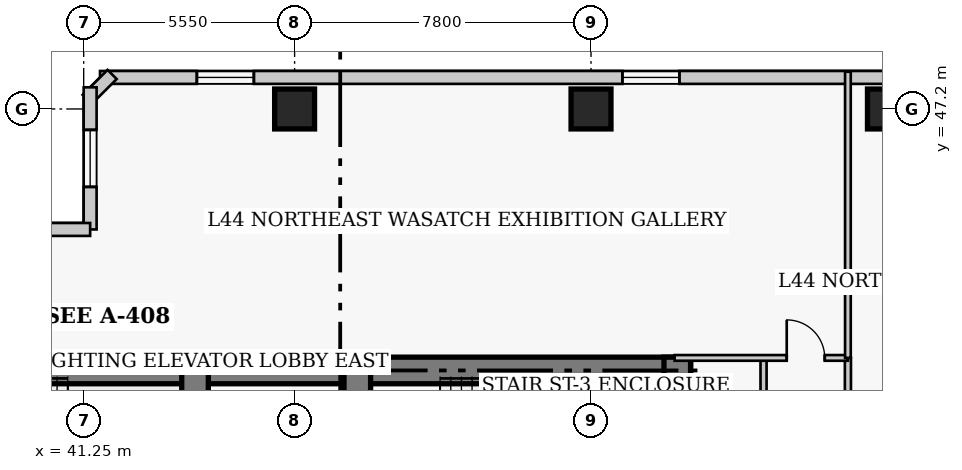
"""IFC4 building model, lengths in metres.
Left out: names, types, materials, properties, quantities, classifications, styles, units other than length and angle.
Written with IfcOpenShell. Run it as: python <this file> out.ifc"""

import sys

from ifc_helpers import new_model, si_unit, direction, frame, frame_2d, origin, origin_2d, place, context, subcontext, project, spatial, rectangle, extrude, element, fill, save


model = new_model("IFC4")
c1 = context("Model", 3, precision=1e-05, world=origin(), true_north=direction((0.0, 1.0)))
c2 = subcontext(c1, "Body", "Model", "MODEL_VIEW")
j1 = project(units=[si_unit("LENGTHUNIT", "METRE"), si_unit("PLANEANGLEUNIT", "RADIAN")], contexts=[c1])
p1 = place(None, origin())
s1 = spatial("IfcSite", under=j1, at=p1, CompositionType="ELEMENT")
p2 = place(p1, origin())
s2 = spatial("IfcBuilding", under=s1, at=p2, CompositionType="ELEMENT")
p3 = place(p2, frame((0.0, 0.0, 176.4)))
s3 = spatial("IfcBuildingStorey", under=s2, at=p3, CompositionType="ELEMENT", Elevation=176.4)
p4 = place(p3, frame((35.85, 40.32, 0.0), z_axis=(0.0, 0.0, 1.0), x_axis=(1.0, 0.0, 0.0)))
e1 = element("IfcWall", 1, at=p4, inside=s3, PredefinedType="SHEAR", context=c2, shape_type="SweptSolid", body=[
    extrude(rectangle(XDim=12.6, YDim=0.7, at=frame_2d((6.3, 0.0))), origin(), (0.0, 0.0, 1.0), 3.8),
])
p5 = place(p3, frame((48.45, 40.32, 0.0), z_axis=(0.0, 0.0, 1.0), x_axis=(1.0, 0.0, 0.0)))
e2 = element("IfcWall", 2, at=p5, inside=s3, PredefinedType="SHEAR", context=c2, shape_type="SweptSolid", body=[
    extrude(rectangle(XDim=8.77, YDim=0.7, at=frame_2d((4.385, 0.0))), origin(), (0.0, 0.0, 1.0), 3.8),
])
p6 = place(p3, frame((56.87, 27.05, 0.0), z_axis=(0.0, 0.0, 1.0), x_axis=(0.0, 1.0, 0.0)))
e3 = element("IfcWall", 3, at=p6, inside=s3, PredefinedType="SHEAR", context=c2, shape_type="SweptSolid", body=[
    extrude(rectangle(XDim=13.62, YDim=0.7, at=frame_2d((6.81, 0.0))), origin(), (0.0, 0.0, 1.0), 3.8),
])
p7 = place(p3, frame((44.18, 36.37, 0.0), z_axis=(0.0, 0.0, 1.0), x_axis=(0.0, 1.0, 0.0)))
e4 = element("IfcWall", 4, at=p7, inside=s3, PredefinedType="SHEAR", context=c2, shape_type="SweptSolid", body=[
    extrude(rectangle(XDim=3.95, YDim=0.7, at=frame_2d((1.975, 0.0))), origin(), (0.0, 0.0, 1.0), 3.8),
])
p8 = place(p3, frame((48.45, 32.4, 0.0), z_axis=(0.0, 0.0, 1.0), x_axis=(0.0, 1.0, 0.0)))
e5 = element("IfcWall", 5, at=p8, inside=s3, PredefinedType="SHEAR", context=c2, shape_type="SweptSolid", body=[
    extrude(rectangle(XDim=7.92, YDim=0.7, at=frame_2d((3.96, 0.0))), origin(), (0.0, 0.0, 1.0), 3.8),
])
p9 = place(p8, frame((5.8, 0.0, 0.0)))
e6 = element("IfcOpeningElement", 6, at=p9, cuts=e5, PredefinedType="OPENING", context=c2, shape_type="SweptSolid", body=[
    extrude(rectangle(XDim=1.1, YDim=2.15, at=frame_2d((0.55, 1.075))), frame((0.0, 0.36, 0.0), z_axis=(0.0, -1.0, 0.0), x_axis=(1.0, 0.0, 0.0)), (0.0, 0.0, 1.0), 0.72),
])
for number, where, z_axis, x_axis in (
    (7, (46.8, 47.2, 0.0), (0.0, 0.0, 1.0), (1.0, 0.0, 0.0)),
    (8, (54.6, 47.2, 0.0), (0.0, 0.0, 1.0), (1.0, 0.0, 0.0)),
    (9, (62.4, 47.2, 0.0), (0.0, 0.0, 1.0), (1.0, 0.0, 0.0)),
):
    element("IfcColumn", number, at=place(p3, frame(where, z_axis=z_axis, x_axis=x_axis)), inside=s3, PredefinedType="COLUMN", context=c2, shape_type="SweptSolid", body=[
        extrude(rectangle(XDim=1.05, YDim=1.05, at=origin_2d()), origin(), (0.0, 0.0, 1.0), 3.8),
    ])
p10 = place(p3, frame((68.37, 48.03, 0.0), z_axis=(0.0, 0.0, 1.0), x_axis=(-1.0, 0.0, 0.0)))
e10 = element("IfcWall", 10, at=p10, inside=s3, PredefinedType="SOLIDWALL", context=c2, shape_type="SweptSolid", body=[
    extrude(rectangle(XDim=26.69, YDim=0.34, at=frame_2d((13.345, 0.0))), origin(), (0.0, 0.0, 1.0), 3.55),
])
p11 = place(p10, frame((3.048, 0.0, 0.85)))
e11 = element("IfcOpeningElement", 11, at=p11, cuts=e10, PredefinedType="OPENING", context=c2, shape_type="SweptSolid", body=[
    extrude(rectangle(XDim=1.5, YDim=1.75, at=frame_2d((0.75, 0.875))), frame((0.0, 0.18, 0.0), z_axis=(0.0, -1.0, 0.0), x_axis=(1.0, 0.0, 0.0)), (0.0, 0.0, 1.0), 0.36),
])
p12 = place(p10, frame((11.445, 0.0, 0.85)))
e12 = element("IfcOpeningElement", 12, at=p12, cuts=e10, PredefinedType="OPENING", context=c2, shape_type="SweptSolid", body=[
    extrude(rectangle(XDim=1.5, YDim=1.75, at=frame_2d((0.75, 0.875))), frame((0.0, 0.18, 0.0), z_axis=(0.0, -1.0, 0.0), x_axis=(1.0, 0.0, 0.0)), (0.0, 0.0, 1.0), 0.36),
])
p13 = place(p10, frame((22.642, 0.0, 0.85)))
e13 = element("IfcOpeningElement", 13, at=p13, cuts=e10, PredefinedType="OPENING", context=c2, shape_type="SweptSolid", body=[
    extrude(rectangle(XDim=1.5, YDim=1.75, at=frame_2d((0.75, 0.875))), frame((0.0, 0.18, 0.0), z_axis=(0.0, -1.0, 0.0), x_axis=(1.0, 0.0, 0.0)), (0.0, 0.0, 1.0), 0.36),
])
p14 = place(p3, frame((41.999, 48.108, 0.0), z_axis=(0.0, 0.0, 1.0), x_axis=(-0.707106781187, -0.707106781187, 0.0)))
e14 = element("IfcWall", 14, at=p14, inside=s3, PredefinedType="SOLIDWALL", context=c2, shape_type="SweptSolid", body=[
    extrude(rectangle(XDim=0.929, YDim=0.34, at=frame_2d((0.464, 0.0))), origin(), (0.0, 0.0, 1.0), 3.55),
])
p15 = place(p3, frame((41.42, 47.77, 0.0), z_axis=(0.0, 0.0, 1.0), x_axis=(0.0, -1.0, 0.0)))
e15 = element("IfcWall", 15, at=p15, inside=s3, PredefinedType="SOLIDWALL", context=c2, shape_type="SweptSolid", body=[
    extrude(rectangle(XDim=3.74, YDim=0.34, at=frame_2d((1.87, 0.0))), origin(), (0.0, 0.0, 1.0), 3.55),
])
p16 = place(p15, frame((1.12, 0.0, 0.85)))
e16 = element("IfcOpeningElement", 16, at=p16, cuts=e15, PredefinedType="OPENING", context=c2, shape_type="SweptSolid", body=[
    extrude(rectangle(XDim=1.5, YDim=1.75, at=frame_2d((0.75, 0.875))), frame((0.0, 0.18, 0.0), z_axis=(0.0, -1.0, 0.0), x_axis=(1.0, 0.0, 0.0)), (0.0, 0.0, 1.0), 0.36),
])
p17 = place(p3, frame((41.42, 44.03, 0.0), z_axis=(0.0, 0.0, 1.0), x_axis=(-1.0, 0.0, 0.0)))
e17 = element("IfcWall", 17, at=p17, inside=s3, PredefinedType="SOLIDWALL", context=c2, shape_type="SweptSolid", body=[
    extrude(rectangle(XDim=4.84, YDim=0.34, at=frame_2d((2.42, 0.0))), origin(), (0.0, 0.0, 1.0), 3.55),
])
p18 = place(p17, frame((1.67, 0.0, 0.85)))
e18 = element("IfcOpeningElement", 18, at=p18, cuts=e17, PredefinedType="OPENING", context=c2, shape_type="SweptSolid", body=[
    extrude(rectangle(XDim=1.5, YDim=1.75, at=frame_2d((0.75, 0.875))), frame((0.0, 0.18, 0.0), z_axis=(0.0, -1.0, 0.0), x_axis=(1.0, 0.0, 0.0)), (0.0, 0.0, 1.0), 0.36),
])
p19 = place(p3, frame((61.36, 12.05, 0.0), z_axis=(0.0, 0.0, 1.0), x_axis=(0.0, 1.0, 0.0)))
e19 = element("IfcWall", 19, at=p19, inside=s3, PredefinedType="PARTITIONING", context=c2, shape_type="SweptSolid", body=[
    extrude(rectangle(XDim=28.6, YDim=0.16, at=frame_2d((14.3, 0.0))), origin(), (0.0, 0.0, 1.0), 3.55),
])
p20 = place(p19, frame((3.5, 0.0, 0.0)))
e20 = element("IfcOpeningElement", 20, at=p20, cuts=e19, PredefinedType="OPENING", context=c2, shape_type="SweptSolid", body=[
    extrude(rectangle(XDim=0.95, YDim=2.1, at=frame_2d((0.475, 1.05))), frame((0.0, 0.09, 0.0), z_axis=(0.0, -1.0, 0.0), x_axis=(1.0, 0.0, 0.0)), (0.0, 0.0, 1.0), 0.18),
])
p21 = place(p19, frame((11.875, 0.0, 0.0)))
e21 = element("IfcOpeningElement", 21, at=p21, cuts=e19, PredefinedType="OPENING", context=c2, shape_type="SweptSolid", body=[
    extrude(rectangle(XDim=0.95, YDim=2.1, at=frame_2d((0.475, 1.05))), frame((0.0, 0.09, 0.0), z_axis=(0.0, -1.0, 0.0), x_axis=(1.0, 0.0, 0.0)), (0.0, 0.0, 1.0), 0.18),
])
p22 = place(p19, frame((19.675, 0.0, 0.0)))
e22 = element("IfcOpeningElement", 22, at=p22, cuts=e19, PredefinedType="OPENING", context=c2, shape_type="SweptSolid", body=[
    extrude(rectangle(XDim=0.95, YDim=2.1, at=frame_2d((0.475, 1.05))), frame((0.0, 0.09, 0.0), z_axis=(0.0, -1.0, 0.0), x_axis=(1.0, 0.0, 0.0)), (0.0, 0.0, 1.0), 0.18),
])
p23 = place(p19, frame((24.1, 0.0, 0.0)))
e23 = element("IfcOpeningElement", 23, at=p23, cuts=e19, PredefinedType="OPENING", context=c2, shape_type="SweptSolid", body=[
    extrude(rectangle(XDim=1.0, YDim=2.15, at=frame_2d((0.5, 1.075))), frame((0.0, 0.09, 0.0), z_axis=(0.0, -1.0, 0.0), x_axis=(1.0, 0.0, 0.0)), (0.0, 0.0, 1.0), 0.18),
])
p24 = place(p3, frame((59.14, 17.26, 0.0), z_axis=(0.0, 0.0, 1.0), x_axis=(0.0, 1.0, 0.0)))
e24 = element("IfcWall", 24, at=p24, inside=s3, PredefinedType="PARTITIONING", context=c2, shape_type="SweptSolid", body=[
    extrude(rectangle(XDim=23.39, YDim=0.16, at=frame_2d((11.695, 0.0))), origin(), (0.0, 0.0, 1.0), 3.55),
])
p25 = place(p3, frame((56.8, 40.65, 0.0), z_axis=(0.0, 0.0, 1.0), x_axis=(1.0, 0.0, 0.0)))
e25 = element("IfcWall", 25, at=p25, inside=s3, PredefinedType="PARTITIONING", context=c2, shape_type="SweptSolid", body=[
    extrude(rectangle(XDim=4.56, YDim=0.15, at=frame_2d((2.28, 0.0))), origin(), (0.0, 0.0, 1.0), 3.55),
])
p26 = place(p25, frame((2.95, 0.0, 0.0)))
e26 = element("IfcOpeningElement", 26, at=p26, cuts=e25, PredefinedType="OPENING", context=c2, shape_type="SweptSolid", body=[
    extrude(rectangle(XDim=1.0, YDim=2.15, at=frame_2d((0.5, 1.075))), frame((0.0, 0.085, 0.0), z_axis=(0.0, -1.0, 0.0), x_axis=(1.0, 0.0, 0.0)), (0.0, 0.0, 1.0), 0.17),
])
p27 = place(p3, frame((61.36, 40.65, 0.0), z_axis=(0.0, 0.0, 1.0), x_axis=(0.0, 1.0, 0.0)))
e27 = element("IfcWall", 27, at=p27, inside=s3, PredefinedType="PARTITIONING", context=c2, shape_type="SweptSolid", body=[
    extrude(rectangle(XDim=7.53, YDim=0.15, at=frame_2d((3.765, 0.0))), origin(), (0.0, 0.0, 1.0), 3.55),
])
p28 = place(p12, origin())
e28 = element("IfcWindow", 28, at=p28, inside=s3, PartitioningType="SINGLE_PANEL", PredefinedType="WINDOW", context=c2, shape_type="SweptSolid", body=[
    extrude(rectangle(XDim=1.5, YDim=1.75, at=frame_2d((0.75, 0.875))), frame((0.0, 0.03, 0.0), z_axis=(0.0, -1.0, 0.0), x_axis=(1.0, 0.0, 0.0)), (0.0, 0.0, 1.0), 0.06),
])
fill(e12, e28)
p29 = place(p13, origin())
e29 = element("IfcWindow", 29, at=p29, inside=s3, PartitioningType="SINGLE_PANEL", PredefinedType="WINDOW", context=c2, shape_type="SweptSolid", body=[
    extrude(rectangle(XDim=1.5, YDim=1.75, at=frame_2d((0.75, 0.875))), frame((0.0, 0.03, 0.0), z_axis=(0.0, -1.0, 0.0), x_axis=(1.0, 0.0, 0.0)), (0.0, 0.0, 1.0), 0.06),
])
fill(e13, e29)
p30 = place(p16, origin())
e30 = element("IfcWindow", 30, at=p30, inside=s3, PartitioningType="SINGLE_PANEL", PredefinedType="WINDOW", context=c2, shape_type="SweptSolid", body=[
    extrude(rectangle(XDim=1.5, YDim=1.75, at=frame_2d((0.75, 0.875))), frame((0.0, 0.03, 0.0), z_axis=(0.0, -1.0, 0.0), x_axis=(1.0, 0.0, 0.0)), (0.0, 0.0, 1.0), 0.06),
])
fill(e16, e30)
p31 = place(p26, origin())
e31 = element("IfcDoor", 31, at=p31, inside=s3, OperationType="SINGLE_SWING_LEFT", PredefinedType="DOOR", context=c2, shape_type="SweptSolid", body=[
    extrude(rectangle(XDim=1.0, YDim=2.15, at=frame_2d((0.5, 1.075))), frame((0.0, 0.025, 0.0), z_axis=(0.0, -1.0, 0.0), x_axis=(1.0, 0.0, 0.0)), (0.0, 0.0, 1.0), 0.05),
])
fill(e26, e31)
save(model, sys.argv[1])
